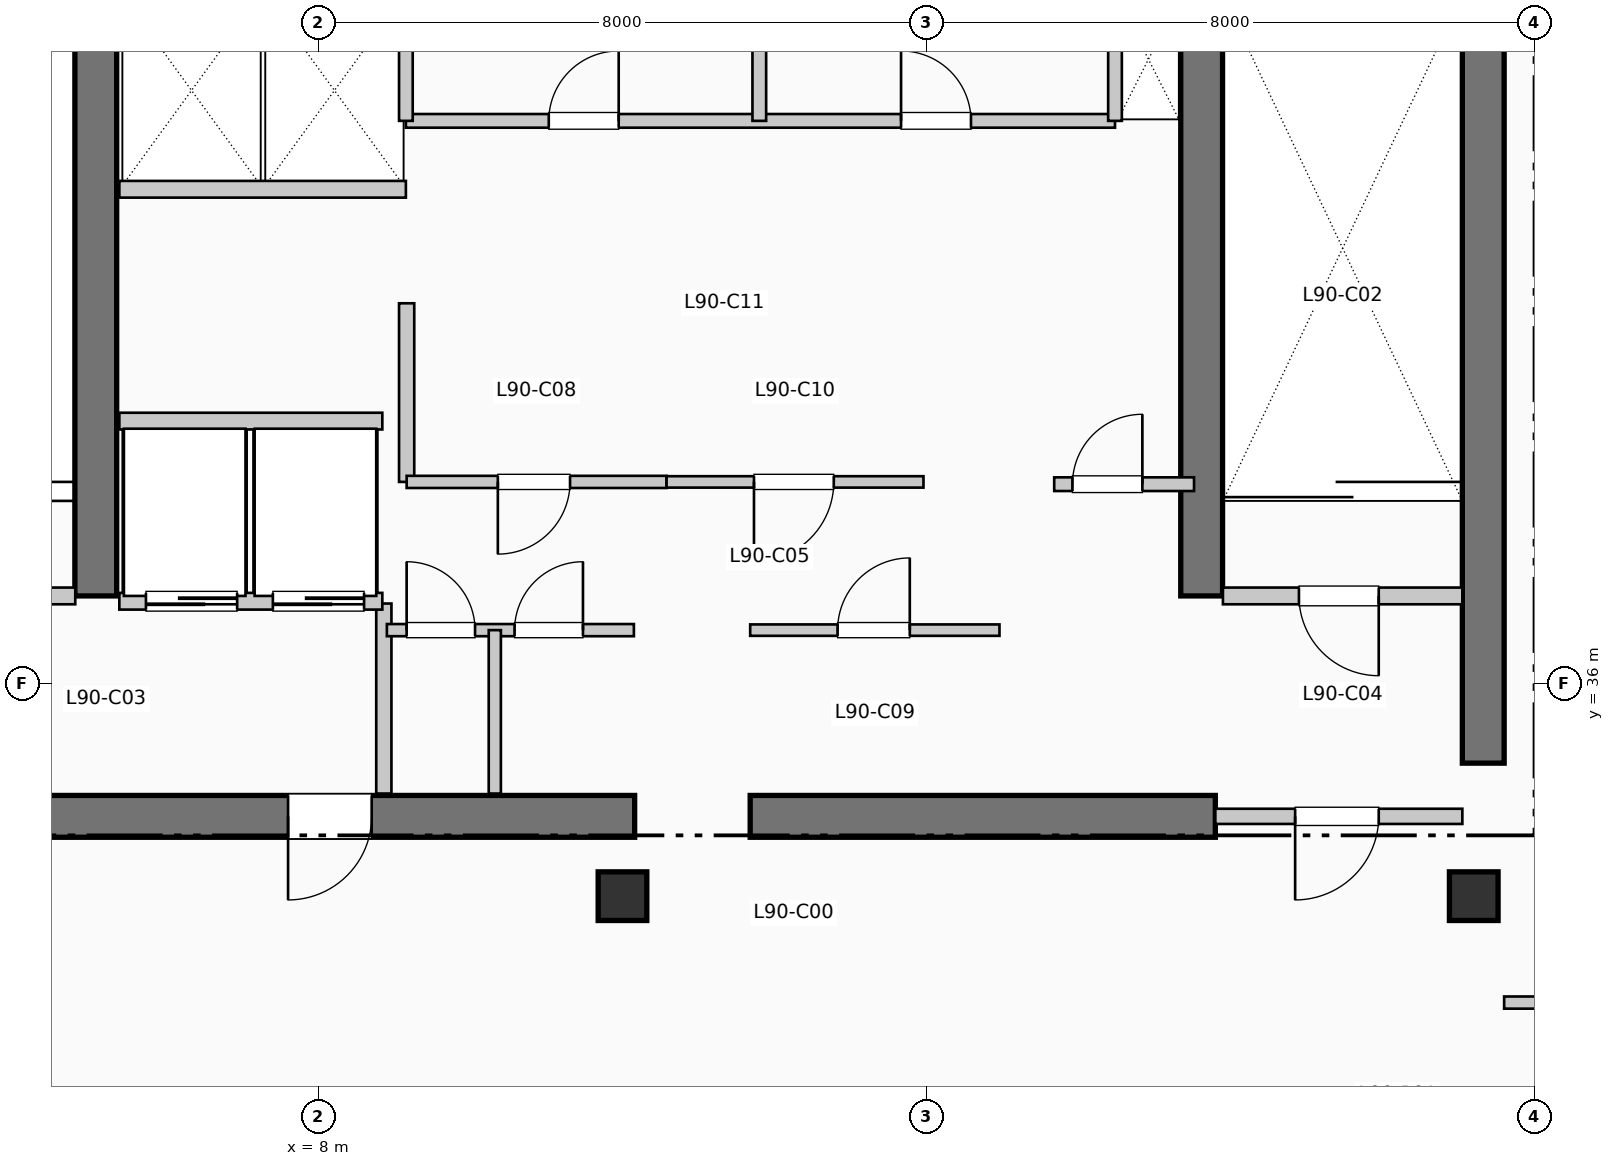
"""IFC4 building model, lengths in metres.
Left out: names, types, materials, properties, quantities, classifications, styles, units other than length and angle.
Written with IfcOpenShell. Run it as: python <this file> out.ifc"""

import sys

from ifc_helpers import new_model, si_unit, direction, frame, frame_2d, origin, origin_2d, place, context, subcontext, project, spatial, rectangle, extrude, element, fill, save


model = new_model("IFC4")
c1 = context("Model", 3, precision=1e-05, world=origin(), true_north=direction((0.0, 1.0)))
c2 = subcontext(c1, "Body", "Model", "MODEL_VIEW")
j1 = project(units=[si_unit("LENGTHUNIT", "METRE"), si_unit("PLANEANGLEUNIT", "RADIAN")], contexts=[c1])
p1 = place(None, origin())
s1 = spatial("IfcSite", under=j1, at=p1, CompositionType="ELEMENT")
p2 = place(p1, origin())
s2 = spatial("IfcBuilding", under=s1, at=p2, CompositionType="ELEMENT")
p3 = place(p2, frame((0.0, 0.0, 369.93)))
s3 = spatial("IfcBuildingStorey", under=s2, at=p3, CompositionType="ELEMENT", Elevation=369.93)
p4 = place(p3, frame((23.325, 34.95, 0.0), z_axis=(0.0, 0.0, 1.0), x_axis=(0.0, 1.0, 0.0)))
e1 = element("IfcWall", 1, at=p4, inside=s3, PredefinedType="SHEAR", context=c2, shape_type="SweptSolid", body=[
    extrude(rectangle(XDim=10.64, YDim=0.55, at=frame_2d((5.32, 0.0))), origin(), (0.0, 0.0, 1.0), 3.96),
])
p5 = place(p3, frame((1.45, 34.25, 0.0), z_axis=(0.0, 0.0, 1.0), x_axis=(1.0, 0.0, 0.0)))
e2 = element("IfcWall", 2, at=p5, inside=s3, PredefinedType="SHEAR", context=c2, shape_type="SweptSolid", body=[
    extrude(rectangle(XDim=10.71, YDim=0.55, at=frame_2d((5.355, 0.0))), origin(), (0.0, 0.0, 1.0), 3.96),
])
p6 = place(p5, frame((7.25, 0.0, 0.0), z_axis=(0.0, 0.0, 1.0), x_axis=(-1.0, 0.0, 0.0)))
e3 = element("IfcOpeningElement", 3, at=p6, cuts=e2, PredefinedType="OPENING", context=c2, shape_type="SweptSolid", body=[
    extrude(rectangle(XDim=1.1, YDim=2.15, at=frame_2d((0.55, 1.075))), frame((0.0, 0.285, 0.0), z_axis=(0.0, -1.0, 0.0), x_axis=(1.0, 0.0, 0.0)), (0.0, 0.0, 1.0), 0.57),
])
p7 = place(p3, frame((13.68, 34.25, 0.0), z_axis=(0.0, 0.0, 1.0), x_axis=(1.0, 0.0, 0.0)))
e4 = element("IfcWall", 4, at=p7, inside=s3, PredefinedType="SHEAR", context=c2, shape_type="SweptSolid", body=[
    extrude(rectangle(XDim=6.12, YDim=0.55, at=frame_2d((3.06, 0.0))), origin(), (0.0, 0.0, 1.0), 3.96),
])
for number, where, z_axis, x_axis in (
    (5, (5.07, 37.15, 0.0), (0.0, 0.0, 1.0), (0.0, 1.0, 0.0)),
    (6, (19.62, 37.15, 0.0), (0.0, 0.0, 1.0), (0.0, 1.0, 0.0)),
):
    element("IfcWall", number, at=place(p3, frame(where, z_axis=z_axis, x_axis=x_axis)), inside=s3, PredefinedType="SHEAR", context=c2, shape_type="SweptSolid", body=[
        extrude(rectangle(XDim=7.89, YDim=0.55, at=frame_2d((3.945, 0.0))), origin(), (0.0, 0.0, 1.0), 3.96),
    ])
for number, where, z_axis, x_axis in (
    (7, (12.0, 33.2, 0.0), (0.0, 0.0, 1.0), (1.0, 0.0, 0.0)),
    (8, (23.2, 33.2, 0.0), (0.0, 0.0, 1.0), (1.0, 0.0, 0.0)),
):
    element("IfcColumn", number, at=place(p3, frame(where, z_axis=z_axis, x_axis=x_axis)), inside=s3, PredefinedType="COLUMN", context=c2, shape_type="SweptSolid", body=[
        extrude(rectangle(XDim=0.64, YDim=0.64, at=origin_2d()), origin(), (0.0, 0.0, 1.0), 3.96),
    ])
p8 = place(p3, frame((1.65, 37.15, 0.0), z_axis=(0.0, 0.0, 1.0), x_axis=(1.0, 0.0, 0.0)))
e9 = element("IfcWall", 9, at=p8, inside=s3, PredefinedType="PARTITIONING", context=c2, shape_type="SweptSolid", body=[
    extrude(rectangle(XDim=3.15, YDim=0.22, at=frame_2d((1.575, 0.0))), origin(), (0.0, 0.0, 1.0), 3.96),
])
p9 = place(p8, frame((2.05, 0.0, 0.0), z_axis=(0.0, 0.0, 1.0), x_axis=(-1.0, 0.0, 0.0)))
e10 = element("IfcOpeningElement", 10, at=p9, cuts=e9, PredefinedType="OPENING", context=c2, shape_type="SweptSolid", body=[
    extrude(rectangle(XDim=1.05, YDim=2.15, at=frame_2d((0.525, 1.075))), frame((0.0, 0.12, 0.0), z_axis=(0.0, -1.0, 0.0), x_axis=(1.0, 0.0, 0.0)), (0.0, 0.0, 1.0), 0.24),
])
p10 = place(p3, frame((8.86, 34.55, 0.0), z_axis=(0.0, 0.0, 1.0), x_axis=(0.0, 1.0, 0.0)))
e11 = element("IfcWall", 11, at=p10, inside=s3, PredefinedType="PARTITIONING", context=c2, shape_type="SweptSolid", body=[
    extrude(rectangle(XDim=2.5, YDim=0.2, at=frame_2d((1.25, 0.0))), origin(), (0.0, 0.0, 1.0), 3.96),
])
p11 = place(p3, frame((19.9, 37.15, 0.0), z_axis=(0.0, 0.0, 1.0), x_axis=(1.0, 0.0, 0.0)))
e12 = element("IfcWall", 12, at=p11, inside=s3, PredefinedType="PARTITIONING", context=c2, shape_type="SweptSolid", body=[
    extrude(rectangle(XDim=3.15, YDim=0.22, at=frame_2d((1.575, 0.0))), origin(), (0.0, 0.0, 1.0), 3.96),
])
p12 = place(p11, frame((2.05, 0.0, 0.0), z_axis=(0.0, 0.0, 1.0), x_axis=(-1.0, 0.0, 0.0)))
e13 = element("IfcOpeningElement", 13, at=p12, cuts=e12, PredefinedType="OPENING", context=c2, shape_type="SweptSolid", body=[
    extrude(rectangle(XDim=1.05, YDim=2.15, at=frame_2d((0.525, 1.075))), frame((0.0, 0.12, 0.0), z_axis=(0.0, -1.0, 0.0), x_axis=(1.0, 0.0, 0.0)), (0.0, 0.0, 1.0), 0.24),
])
p13 = place(p3, frame((19.8, 34.25, 0.0), z_axis=(0.0, 0.0, 1.0), x_axis=(1.0, 0.0, 0.0)))
e14 = element("IfcWall", 14, at=p13, inside=s3, PredefinedType="PARTITIONING", context=c2, shape_type="SweptSolid", body=[
    extrude(rectangle(XDim=3.25, YDim=0.2, at=frame_2d((1.625, 0.0))), origin(), (0.0, 0.0, 1.0), 3.96),
])
p14 = place(p13, frame((2.15, 0.0, 0.0), z_axis=(0.0, 0.0, 1.0), x_axis=(-1.0, 0.0, 0.0)))
e15 = element("IfcOpeningElement", 15, at=p14, cuts=e14, PredefinedType="OPENING", context=c2, shape_type="SweptSolid", body=[
    extrude(rectangle(XDim=1.1, YDim=2.15, at=frame_2d((0.55, 1.075))), frame((0.0, 0.11, 0.0), z_axis=(0.0, -1.0, 0.0), x_axis=(1.0, 0.0, 0.0)), (0.0, 0.0, 1.0), 0.22),
])
p15 = place(p3, frame((5.38, 37.08, 0.0), z_axis=(0.0, 0.0, 1.0), x_axis=(1.0, 0.0, 0.0)))
e16 = element("IfcWall", 16, at=p15, inside=s3, PredefinedType="PARTITIONING", context=c2, shape_type="SweptSolid", body=[
    extrude(rectangle(XDim=3.46, YDim=0.22, at=frame_2d((1.73, 0.0))), origin(), (0.0, 0.0, 1.0), 3.96),
])
p16 = place(p15, frame((1.55, 0.0, 0.0), z_axis=(0.0, 0.0, 1.0), x_axis=(-1.0, 0.0, 0.0)))
e17 = element("IfcOpeningElement", 17, at=p16, cuts=e16, PredefinedType="OPENING", context=c2, shape_type="SweptSolid", body=[
    extrude(rectangle(XDim=1.2, YDim=2.2, at=frame_2d((0.6, 1.1))), frame((0.0, 0.12, 0.0), z_axis=(0.0, -1.0, 0.0), x_axis=(1.0, 0.0, 0.0)), (0.0, 0.0, 1.0), 0.24),
])
p17 = place(p15, frame((3.22, 0.0, 0.0), z_axis=(0.0, 0.0, 1.0), x_axis=(-1.0, 0.0, 0.0)))
e18 = element("IfcOpeningElement", 18, at=p17, cuts=e16, PredefinedType="OPENING", context=c2, shape_type="SweptSolid", body=[
    extrude(rectangle(XDim=1.2, YDim=2.2, at=frame_2d((0.6, 1.1))), frame((0.0, 0.12, 0.0), z_axis=(0.0, -1.0, 0.0), x_axis=(1.0, 0.0, 0.0)), (0.0, 0.0, 1.0), 0.24),
])
p18 = place(p3, frame((5.38, 39.45, 0.0), z_axis=(0.0, 0.0, 1.0), x_axis=(1.0, 0.0, 0.0)))
e19 = element("IfcWall", 19, at=p18, inside=s3, PredefinedType="PARTITIONING", context=c2, shape_type="SweptSolid", body=[
    extrude(rectangle(XDim=3.46, YDim=0.22, at=frame_2d((1.73, 0.0))), origin(), (0.0, 0.0, 1.0), 3.96),
])
p19 = place(p3, frame((5.38, 42.5, 0.0), z_axis=(0.0, 0.0, 1.0), x_axis=(1.0, 0.0, 0.0)))
e20 = element("IfcWall", 20, at=p19, inside=s3, PredefinedType="PARTITIONING", context=c2, shape_type="SweptSolid", body=[
    extrude(rectangle(XDim=3.77, YDim=0.22, at=frame_2d((1.885, 0.0))), origin(), (0.0, 0.0, 1.0), 3.96),
])
p20 = place(p3, frame((9.16, 38.65, 0.0), z_axis=(0.0, 0.0, 1.0), x_axis=(0.0, 1.0, 0.0)))
e21 = element("IfcWall", 21, at=p20, inside=s3, PredefinedType="PARTITIONING", context=c2, shape_type="SweptSolid", body=[
    extrude(rectangle(XDim=2.35, YDim=0.2, at=frame_2d((1.175, 0.0))), origin(), (0.0, 0.0, 1.0), 3.96),
])
p21 = place(p3, frame((17.68, 38.62, 0.0), z_axis=(0.0, 0.0, 1.0), x_axis=(1.0, 0.0, 0.0)))
e22 = element("IfcWall", 22, at=p21, inside=s3, PredefinedType="PARTITIONING", context=c2, shape_type="SweptSolid", body=[
    extrude(rectangle(XDim=1.84, YDim=0.18, at=frame_2d((0.92, 0.0))), origin(), (0.0, 0.0, 1.0), 3.96),
])
p22 = place(p21, frame((0.24, 0.0, 0.0)))
e23 = element("IfcOpeningElement", 23, at=p22, cuts=e22, PredefinedType="OPENING", context=c2, shape_type="SweptSolid", body=[
    extrude(rectangle(XDim=0.92, YDim=2.1, at=frame_2d((0.46, 1.05))), frame((0.0, 0.1, 0.0), z_axis=(0.0, -1.0, 0.0), x_axis=(1.0, 0.0, 0.0)), (0.0, 0.0, 1.0), 0.2),
])
p23 = place(p3, frame((8.9, 36.7, 0.0), z_axis=(0.0, 0.0, 1.0), x_axis=(1.0, 0.0, 0.0)))
e24 = element("IfcWall", 24, at=p23, inside=s3, PredefinedType="PARTITIONING", context=c2, shape_type="SweptSolid", body=[
    extrude(rectangle(XDim=3.25, YDim=0.16, at=frame_2d((1.625, 0.0))), origin(), (0.0, 0.0, 1.0), 3.96),
])
p24 = place(p23, frame((0.26, 0.0, 0.0)))
e25 = element("IfcOpeningElement", 25, at=p24, cuts=e24, PredefinedType="OPENING", context=c2, shape_type="SweptSolid", body=[
    extrude(rectangle(XDim=0.9, YDim=2.15, at=frame_2d((0.45, 1.075))), frame((0.0, 0.09, 0.0), z_axis=(0.0, -1.0, 0.0), x_axis=(1.0, 0.0, 0.0)), (0.0, 0.0, 1.0), 0.18),
])
p25 = place(p23, frame((1.68, 0.0, 0.0)))
e26 = element("IfcOpeningElement", 26, at=p25, cuts=e24, PredefinedType="OPENING", context=c2, shape_type="SweptSolid", body=[
    extrude(rectangle(XDim=0.9, YDim=2.15, at=frame_2d((0.45, 1.075))), frame((0.0, 0.09, 0.0), z_axis=(0.0, -1.0, 0.0), x_axis=(1.0, 0.0, 0.0)), (0.0, 0.0, 1.0), 0.18),
])
p26 = place(p3, frame((10.32, 34.55, 0.0), z_axis=(0.0, 0.0, 1.0), x_axis=(0.0, 1.0, 0.0)))
e27 = element("IfcWall", 27, at=p26, inside=s3, PredefinedType="PARTITIONING", context=c2, shape_type="SweptSolid", body=[
    extrude(rectangle(XDim=2.15, YDim=0.16, at=frame_2d((1.075, 0.0))), origin(), (0.0, 0.0, 1.0), 3.96),
])
p27 = place(p3, frame((9.16, 38.65, 0.0), z_axis=(0.0, 0.0, 1.0), x_axis=(1.0, 0.0, 0.0)))
e28 = element("IfcWall", 28, at=p27, inside=s3, PredefinedType="PARTITIONING", context=c2, shape_type="SweptSolid", body=[
    extrude(rectangle(XDim=3.42, YDim=0.16, at=frame_2d((1.71, 0.0))), origin(), (0.0, 0.0, 1.0), 3.96),
])
p28 = place(p27, frame((2.15, 0.0, 0.0), z_axis=(0.0, 0.0, 1.0), x_axis=(-1.0, 0.0, 0.0)))
e29 = element("IfcOpeningElement", 29, at=p28, cuts=e28, PredefinedType="OPENING", context=c2, shape_type="SweptSolid", body=[
    extrude(rectangle(XDim=0.95, YDim=2.15, at=frame_2d((0.475, 1.075))), frame((0.0, 0.09, 0.0), z_axis=(0.0, -1.0, 0.0), x_axis=(1.0, 0.0, 0.0)), (0.0, 0.0, 1.0), 0.18),
])
p29 = place(p3, frame((13.68, 36.7, 0.0), z_axis=(0.0, 0.0, 1.0), x_axis=(1.0, 0.0, 0.0)))
e30 = element("IfcWall", 30, at=p29, inside=s3, PredefinedType="PARTITIONING", context=c2, shape_type="SweptSolid", body=[
    extrude(rectangle(XDim=3.28, YDim=0.15, at=frame_2d((1.64, 0.0))), origin(), (0.0, 0.0, 1.0), 3.96),
])
p30 = place(p29, frame((1.15, 0.0, 0.0)))
e31 = element("IfcOpeningElement", 31, at=p30, cuts=e30, PredefinedType="OPENING", context=c2, shape_type="SweptSolid", body=[
    extrude(rectangle(XDim=0.95, YDim=2.15, at=frame_2d((0.475, 1.075))), frame((0.0, 0.085, 0.0), z_axis=(0.0, -1.0, 0.0), x_axis=(1.0, 0.0, 0.0)), (0.0, 0.0, 1.0), 0.17),
])
p31 = place(p3, frame((12.58, 38.65, 0.0), z_axis=(0.0, 0.0, 1.0), x_axis=(1.0, 0.0, 0.0)))
e32 = element("IfcWall", 32, at=p31, inside=s3, PredefinedType="PARTITIONING", context=c2, shape_type="SweptSolid", body=[
    extrude(rectangle(XDim=3.38, YDim=0.15, at=frame_2d((1.69, 0.0))), origin(), (0.0, 0.0, 1.0), 3.96),
])
p32 = place(p31, frame((2.2, 0.0, 0.0), z_axis=(0.0, 0.0, 1.0), x_axis=(-1.0, 0.0, 0.0)))
e33 = element("IfcOpeningElement", 33, at=p32, cuts=e32, PredefinedType="OPENING", context=c2, shape_type="SweptSolid", body=[
    extrude(rectangle(XDim=1.05, YDim=2.15, at=frame_2d((0.525, 1.075))), frame((0.0, 0.085, 0.0), z_axis=(0.0, -1.0, 0.0), x_axis=(1.0, 0.0, 0.0)), (0.0, 0.0, 1.0), 0.17),
])
p33 = place(p3, frame((9.15, 43.4, 0.0), z_axis=(0.0, 0.0, 1.0), x_axis=(1.0, 0.0, 0.0)))
e34 = element("IfcWall", 34, at=p33, inside=s3, PredefinedType="PLUMBINGWALL", context=c2, shape_type="SweptSolid", body=[
    extrude(rectangle(XDim=9.33, YDim=0.18, at=frame_2d((4.665, 0.0))), origin(), (0.0, 0.0, 1.0), 3.96),
])
p34 = place(p33, frame((1.88, 0.0, 0.0)))
e35 = element("IfcOpeningElement", 35, at=p34, cuts=e34, PredefinedType="OPENING", context=c2, shape_type="SweptSolid", body=[
    extrude(rectangle(XDim=0.92, YDim=2.1, at=frame_2d((0.46, 1.05))), frame((0.0, 0.1, 0.0), z_axis=(0.0, -1.0, 0.0), x_axis=(1.0, 0.0, 0.0)), (0.0, 0.0, 1.0), 0.2),
])
p35 = place(p33, frame((6.515, 0.0, 0.0)))
e36 = element("IfcOpeningElement", 36, at=p35, cuts=e34, PredefinedType="OPENING", context=c2, shape_type="SweptSolid", body=[
    extrude(rectangle(XDim=0.92, YDim=2.1, at=frame_2d((0.46, 1.05))), frame((0.0, 0.1, 0.0), z_axis=(0.0, -1.0, 0.0), x_axis=(1.0, 0.0, 0.0)), (0.0, 0.0, 1.0), 0.2),
])
for number, where, z_axis, x_axis in (
    (37, (9.15, 43.4, 0.0), (0.0, 0.0, 1.0), (0.0, 1.0, 0.0)),
    (38, (18.48, 43.4, 0.0), (0.0, 0.0, 1.0), (0.0, 1.0, 0.0)),
    (39, (13.8, 43.4, 0.0), (0.0, 0.0, 1.0), (0.0, 1.0, 0.0)),
):
    element("IfcWall", number, at=place(p3, frame(where, z_axis=z_axis, x_axis=x_axis)), inside=s3, PredefinedType="PLUMBINGWALL", context=c2, shape_type="SweptSolid", body=[
        extrude(rectangle(XDim=1.88, YDim=0.18, at=frame_2d((0.94, 0.0))), origin(), (0.0, 0.0, 1.0), 3.96),
    ])
p36 = place(p3, frame((23.6, 31.8, 0.0), z_axis=(0.0, 0.0, 1.0), x_axis=(1.0, 0.0, 0.0)))
e40 = element("IfcWall", 40, at=p36, inside=s3, PredefinedType="PARTITIONING", context=c2, shape_type="SweptSolid", body=[
    extrude(rectangle(XDim=20.61, YDim=0.16, at=frame_2d((10.305, 0.0))), origin(), (0.0, 0.0, 1.0), 3.96),
])
p37 = place(p36, frame((2.5, 0.0, 0.0)))
e41 = element("IfcOpeningElement", 41, at=p37, cuts=e40, PredefinedType="OPENING", context=c2, shape_type="SweptSolid", body=[
    extrude(rectangle(XDim=0.95, YDim=2.1, at=frame_2d((0.475, 1.05))), frame((0.0, 0.09, 0.0), z_axis=(0.0, -1.0, 0.0), x_axis=(1.0, 0.0, 0.0)), (0.0, 0.0, 1.0), 0.18),
])
p38 = place(p36, frame((12.805, 0.0, 0.0)))
e42 = element("IfcOpeningElement", 42, at=p38, cuts=e40, PredefinedType="OPENING", context=c2, shape_type="SweptSolid", body=[
    extrude(rectangle(XDim=0.95, YDim=2.1, at=frame_2d((0.475, 1.05))), frame((0.0, 0.09, 0.0), z_axis=(0.0, -1.0, 0.0), x_axis=(1.0, 0.0, 0.0)), (0.0, 0.0, 1.0), 0.18),
])
p39 = place(p6, origin())
e43 = element("IfcDoor", 43, at=p39, inside=s3, OperationType="SINGLE_SWING_LEFT", PredefinedType="DOOR", context=c2, shape_type="SweptSolid", body=[
    extrude(rectangle(XDim=1.1, YDim=2.15, at=frame_2d((0.55, 1.075))), frame((0.0, 0.025, 0.0), z_axis=(0.0, -1.0, 0.0), x_axis=(1.0, 0.0, 0.0)), (0.0, 0.0, 1.0), 0.05),
])
fill(e3, e43)
p40 = place(p12, origin())
e44 = element("IfcDoor", 44, at=p40, inside=s3, OperationType="SINGLE_SWING_RIGHT", PredefinedType="DOOR", context=c2, shape_type="SweptSolid", body=[
    extrude(rectangle(XDim=1.05, YDim=2.15, at=frame_2d((0.525, 1.075))), frame((0.0, 0.025, 0.0), z_axis=(0.0, -1.0, 0.0), x_axis=(1.0, 0.0, 0.0)), (0.0, 0.0, 1.0), 0.05),
])
fill(e13, e44)
p41 = place(p14, origin())
e45 = element("IfcDoor", 45, at=p41, inside=s3, OperationType="SINGLE_SWING_LEFT", PredefinedType="DOOR", context=c2, shape_type="SweptSolid", body=[
    extrude(rectangle(XDim=1.1, YDim=2.15, at=frame_2d((0.55, 1.075))), frame((0.0, 0.025, 0.0), z_axis=(0.0, -1.0, 0.0), x_axis=(1.0, 0.0, 0.0)), (0.0, 0.0, 1.0), 0.05),
])
fill(e15, e45)
p42 = place(p16, origin())
e46 = element("IfcDoor", 46, at=p42, inside=s3, OperationType="SLIDING_TO_RIGHT", PredefinedType="DOOR", context=c2, shape_type="SweptSolid", body=[
    extrude(rectangle(XDim=1.2, YDim=2.2, at=frame_2d((0.6, 1.1))), frame((0.0, 0.025, 0.0), z_axis=(0.0, -1.0, 0.0), x_axis=(1.0, 0.0, 0.0)), (0.0, 0.0, 1.0), 0.05),
])
fill(e17, e46)
p43 = place(p17, origin())
e47 = element("IfcDoor", 47, at=p43, inside=s3, OperationType="SLIDING_TO_RIGHT", PredefinedType="DOOR", context=c2, shape_type="SweptSolid", body=[
    extrude(rectangle(XDim=1.2, YDim=2.2, at=frame_2d((0.6, 1.1))), frame((0.0, 0.025, 0.0), z_axis=(0.0, -1.0, 0.0), x_axis=(1.0, 0.0, 0.0)), (0.0, 0.0, 1.0), 0.05),
])
fill(e18, e47)
p44 = place(p22, origin())
e48 = element("IfcDoor", 48, at=p44, inside=s3, OperationType="SINGLE_SWING_RIGHT", PredefinedType="DOOR", context=c2, shape_type="SweptSolid", body=[
    extrude(rectangle(XDim=0.92, YDim=2.1, at=frame_2d((0.46, 1.05))), frame((0.0, 0.025, 0.0), z_axis=(0.0, -1.0, 0.0), x_axis=(1.0, 0.0, 0.0)), (0.0, 0.0, 1.0), 0.05),
])
fill(e23, e48)
p45 = place(p24, origin())
e49 = element("IfcDoor", 49, at=p45, inside=s3, OperationType="SINGLE_SWING_LEFT", PredefinedType="DOOR", context=c2, shape_type="SweptSolid", body=[
    extrude(rectangle(XDim=0.9, YDim=2.15, at=frame_2d((0.45, 1.075))), frame((0.0, 0.025, 0.0), z_axis=(0.0, -1.0, 0.0), x_axis=(1.0, 0.0, 0.0)), (0.0, 0.0, 1.0), 0.05),
])
fill(e25, e49)
p46 = place(p25, origin())
e50 = element("IfcDoor", 50, at=p46, inside=s3, OperationType="SINGLE_SWING_RIGHT", PredefinedType="DOOR", context=c2, shape_type="SweptSolid", body=[
    extrude(rectangle(XDim=0.9, YDim=2.15, at=frame_2d((0.45, 1.075))), frame((0.0, 0.025, 0.0), z_axis=(0.0, -1.0, 0.0), x_axis=(1.0, 0.0, 0.0)), (0.0, 0.0, 1.0), 0.05),
])
fill(e26, e50)
p47 = place(p28, origin())
e51 = element("IfcDoor", 51, at=p47, inside=s3, OperationType="SINGLE_SWING_LEFT", PredefinedType="DOOR", context=c2, shape_type="SweptSolid", body=[
    extrude(rectangle(XDim=0.95, YDim=2.15, at=frame_2d((0.475, 1.075))), frame((0.0, 0.025, 0.0), z_axis=(0.0, -1.0, 0.0), x_axis=(1.0, 0.0, 0.0)), (0.0, 0.0, 1.0), 0.05),
])
fill(e29, e51)
p48 = place(p30, origin())
e52 = element("IfcDoor", 52, at=p48, inside=s3, OperationType="SINGLE_SWING_RIGHT", PredefinedType="DOOR", context=c2, shape_type="SweptSolid", body=[
    extrude(rectangle(XDim=0.95, YDim=2.15, at=frame_2d((0.475, 1.075))), frame((0.0, 0.025, 0.0), z_axis=(0.0, -1.0, 0.0), x_axis=(1.0, 0.0, 0.0)), (0.0, 0.0, 1.0), 0.05),
])
fill(e31, e52)
p49 = place(p32, origin())
e53 = element("IfcDoor", 53, at=p49, inside=s3, OperationType="SINGLE_SWING_LEFT", PredefinedType="DOOR", context=c2, shape_type="SweptSolid", body=[
    extrude(rectangle(XDim=1.05, YDim=2.15, at=frame_2d((0.525, 1.075))), frame((0.0, 0.025, 0.0), z_axis=(0.0, -1.0, 0.0), x_axis=(1.0, 0.0, 0.0)), (0.0, 0.0, 1.0), 0.05),
])
fill(e33, e53)
p50 = place(p34, origin())
e54 = element("IfcDoor", 54, at=p50, inside=s3, OperationType="SINGLE_SWING_RIGHT", PredefinedType="DOOR", context=c2, shape_type="SweptSolid", body=[
    extrude(rectangle(XDim=0.92, YDim=2.1, at=frame_2d((0.46, 1.05))), frame((0.0, 0.025, 0.0), z_axis=(0.0, -1.0, 0.0), x_axis=(1.0, 0.0, 0.0)), (0.0, 0.0, 1.0), 0.05),
])
fill(e35, e54)
p51 = place(p35, origin())
e55 = element("IfcDoor", 55, at=p51, inside=s3, OperationType="SINGLE_SWING_LEFT", PredefinedType="DOOR", context=c2, shape_type="SweptSolid", body=[
    extrude(rectangle(XDim=0.92, YDim=2.1, at=frame_2d((0.46, 1.05))), frame((0.0, 0.025, 0.0), z_axis=(0.0, -1.0, 0.0), x_axis=(1.0, 0.0, 0.0)), (0.0, 0.0, 1.0), 0.05),
])
fill(e36, e55)
save(model, sys.argv[1])
